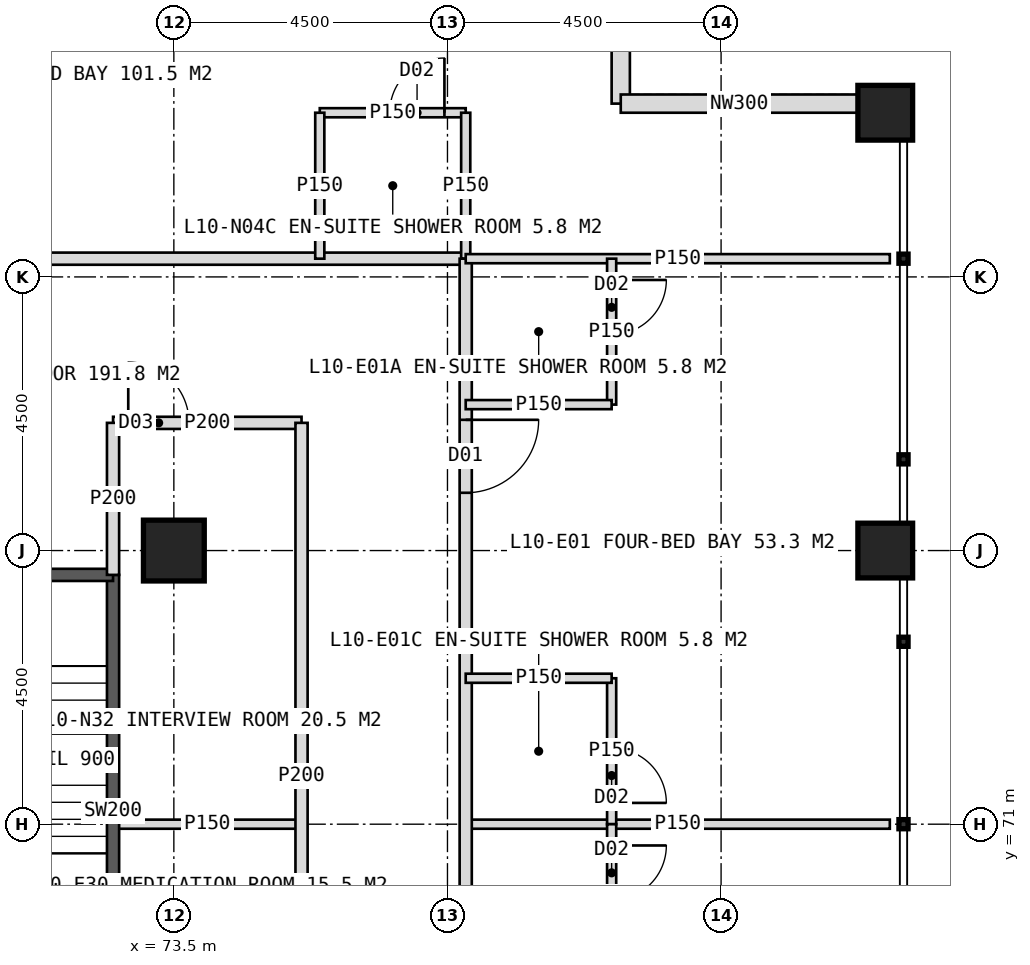
"""IFC4 building model, lengths in metres.
Left out: names, types, materials, properties, quantities, classifications, styles, units other than length and angle.
Written with IfcOpenShell. Run it as: python <this file> out.ifc"""

import sys

from ifc_helpers import new_model, si_unit, direction, frame, frame_2d, origin, origin_2d, place, context, subcontext, project, spatial, rectangle, hollow_rectangle, extrude, element, fill, save


model = new_model("IFC4")
c1 = context("Model", 3, precision=1e-05, world=origin(), true_north=direction((0.0, 1.0)))
c2 = subcontext(c1, "Body", "Model", "MODEL_VIEW")
j1 = project(units=[si_unit("LENGTHUNIT", "METRE"), si_unit("PLANEANGLEUNIT", "RADIAN")], contexts=[c1])
p1 = place(None, origin())
s1 = spatial("IfcSite", under=j1, at=p1, CompositionType="ELEMENT")
p2 = place(p1, origin())
s2 = spatial("IfcBuilding", under=s1, at=p2, CompositionType="ELEMENT")
p3 = place(p2, frame((0.0, 0.0, 47.0)))
s3 = spatial("IfcBuildingStorey", under=s2, at=p3, CompositionType="ELEMENT", Elevation=47.0)
p4 = place(p3, frame((73.5, 75.5, 0.0), z_axis=(0.0, 0.0, 1.0), x_axis=(1.0, 0.0, 0.0)))
e1 = element("IfcColumn", 1, at=p4, inside=s3, PredefinedType="COLUMN", context=c2, shape_type="SweptSolid", body=[
    extrude(hollow_rectangle(XDim=1.0, YDim=1.0, WallThickness=0.1, at=origin_2d()), origin(), (0.0, 0.0, 1.0), 4.0),
])
for number, where, z_axis, x_axis in (
    (2, (85.2, 75.5, 0.0), (0.0, 0.0, 1.0), (1.0, 0.0, 0.0)),
    (3, (85.2, 82.7, 0.0), (0.0, 0.0, 1.0), (1.0, 0.0, 0.0)),
):
    element("IfcColumn", number, at=place(p3, frame(where, z_axis=z_axis, x_axis=x_axis)), inside=s3, PredefinedType="COLUMN", context=c2, shape_type="SweptSolid", body=[
        extrude(hollow_rectangle(XDim=0.9, YDim=0.9, WallThickness=0.08, at=origin_2d()), origin(), (0.0, 0.0, 1.0), 4.0),
    ])
for number, where, z_axis, x_axis in (
    (4, (80.85, 86.75, 0.0), (0.0, 0.0, 1.0), (0.0, -1.0, 0.0)),
    (5, (80.85, 82.85, 0.0), (0.0, 0.0, 1.0), (1.0, 0.0, 0.0)),
):
    element("IfcWall", number, at=place(p3, frame(where, z_axis=z_axis, x_axis=x_axis)), inside=s3, PredefinedType="ELEMENTEDWALL", context=c2, shape_type="SweptSolid", body=[
        extrude(rectangle(XDim=3.9, YDim=0.3, at=frame_2d((1.95, 0.0))), origin(), (0.0, 0.0, 1.0), 2.95),
    ])
p5 = place(p3, frame((41.7, 80.3, 0.0), z_axis=(0.0, 0.0, 1.0), x_axis=(1.0, 0.0, 0.0)))
e6 = element("IfcWall", 6, at=p5, inside=s3, PredefinedType="PARTITIONING", context=c2, shape_type="SweptSolid", body=[
    extrude(rectangle(XDim=36.6, YDim=0.2, at=frame_2d((18.3, 0.0))), origin(), (0.0, 0.0, 1.0), 3.75),
])
p6 = place(p5, frame((2.65, 0.0, 0.0)))
e7 = element("IfcOpeningElement", 7, at=p6, cuts=e6, PredefinedType="OPENING", context=c2, shape_type="SweptSolid", body=[
    extrude(rectangle(XDim=1.2, YDim=2.2, at=frame_2d((0.6, 1.1))), frame((0.0, 0.11, 0.0), z_axis=(0.0, -1.0, 0.0), x_axis=(1.0, 0.0, 0.0)), (0.0, 0.0, 1.0), 0.22),
])
p7 = place(p5, frame((11.95, 0.0, 0.0)))
e8 = element("IfcOpeningElement", 8, at=p7, cuts=e6, PredefinedType="OPENING", context=c2, shape_type="SweptSolid", body=[
    extrude(rectangle(XDim=1.2, YDim=2.2, at=frame_2d((0.6, 1.1))), frame((0.0, 0.11, 0.0), z_axis=(0.0, -1.0, 0.0), x_axis=(1.0, 0.0, 0.0)), (0.0, 0.0, 1.0), 0.22),
])
p8 = place(p5, frame((20.8, 0.0, 0.0)))
e9 = element("IfcOpeningElement", 9, at=p8, cuts=e6, PredefinedType="OPENING", context=c2, shape_type="SweptSolid", body=[
    extrude(rectangle(XDim=1.0, YDim=2.1, at=frame_2d((0.5, 1.05))), frame((0.0, 0.11, 0.0), z_axis=(0.0, -1.0, 0.0), x_axis=(1.0, 0.0, 0.0)), (0.0, 0.0, 1.0), 0.22),
])
p9 = place(p5, frame((26.95, 0.0, 0.0)))
e10 = element("IfcOpeningElement", 10, at=p9, cuts=e6, PredefinedType="OPENING", context=c2, shape_type="SweptSolid", body=[
    extrude(rectangle(XDim=1.2, YDim=2.2, at=frame_2d((0.6, 1.1))), frame((0.0, 0.11, 0.0), z_axis=(0.0, -1.0, 0.0), x_axis=(1.0, 0.0, 0.0)), (0.0, 0.0, 1.0), 0.22),
])
p10 = place(p3, frame((75.9, 82.7, 0.0), z_axis=(0.0, 0.0, 1.0), x_axis=(1.0, 0.0, 0.0)))
e11 = element("IfcWall", 11, at=p10, inside=s3, PredefinedType="PARTITIONING", context=c2, shape_type="SweptSolid", body=[
    extrude(rectangle(XDim=2.4, YDim=0.15, at=frame_2d((1.2, 0.0))), origin(), (0.0, 0.0, 1.0), 2.95),
])
p11 = place(p10, frame((1.15, 0.0, 0.0)))
e12 = element("IfcOpeningElement", 12, at=p11, cuts=e11, PredefinedType="OPENING", context=c2, shape_type="SweptSolid", body=[
    extrude(rectangle(XDim=0.9, YDim=2.1, at=frame_2d((0.45, 1.05))), frame((0.0, 0.085, 0.0), z_axis=(0.0, -1.0, 0.0), x_axis=(1.0, 0.0, 0.0)), (0.0, 0.0, 1.0), 0.17),
])
for number, where, z_axis, x_axis in (
    (13, (75.9, 80.3, 0.0), (0.0, 0.0, 1.0), (0.0, 1.0, 0.0)),
    (14, (78.3, 80.3, 0.0), (0.0, 0.0, 1.0), (0.0, 1.0, 0.0)),
):
    element("IfcWall", number, at=place(p3, frame(where, z_axis=z_axis, x_axis=x_axis)), inside=s3, PredefinedType="PARTITIONING", context=c2, shape_type="SweptSolid", body=[
        extrude(rectangle(XDim=2.4, YDim=0.15, at=frame_2d((1.2, 0.0))), origin(), (0.0, 0.0, 1.0), 3.75),
    ])
p12 = place(p3, frame((72.5, 77.6, 0.0), z_axis=(0.0, 0.0, 1.0), x_axis=(1.0, 0.0, 0.0)))
e15 = element("IfcWall", 15, at=p12, inside=s3, PredefinedType="PARTITIONING", context=c2, shape_type="SweptSolid", body=[
    extrude(rectangle(XDim=3.1, YDim=0.2, at=frame_2d((1.55, 0.0))), origin(), (0.0, 0.0, 1.0), 3.75),
])
p13 = place(p12, frame((0.25, 0.0, 0.0)))
e16 = element("IfcOpeningElement", 16, at=p13, cuts=e15, PredefinedType="OPENING", context=c2, shape_type="SweptSolid", body=[
    extrude(rectangle(XDim=1.0, YDim=2.1, at=frame_2d((0.5, 1.05))), frame((0.0, 0.11, 0.0), z_axis=(0.0, -1.0, 0.0), x_axis=(1.0, 0.0, 0.0)), (0.0, 0.0, 1.0), 0.22),
])
p14 = place(p3, frame((78.3, 71.0, 0.0), z_axis=(0.0, 0.0, 1.0), x_axis=(1.0, 0.0, 0.0)))
e17 = element("IfcWall", 17, at=p14, inside=s3, PredefinedType="PARTITIONING", context=c2, shape_type="SweptSolid", body=[
    extrude(rectangle(XDim=6.975, YDim=0.15, at=frame_2d((3.487, 0.0))), origin(), (0.0, 0.0, 1.0), 3.75),
])
p15 = place(p3, frame((78.3, 80.3, 0.0), z_axis=(0.0, 0.0, 1.0), x_axis=(0.0, -1.0, 0.0)))
e18 = element("IfcWall", 18, at=p15, inside=s3, PredefinedType="PARTITIONING", context=c2, shape_type="SweptSolid", body=[
    extrude(rectangle(XDim=36.6, YDim=0.2, at=frame_2d((18.3, 0.0))), origin(), (0.0, 0.0, 1.0), 3.75),
])
p16 = place(p15, frame((2.65, 0.0, 0.0)))
e19 = element("IfcOpeningElement", 19, at=p16, cuts=e18, PredefinedType="OPENING", context=c2, shape_type="SweptSolid", body=[
    extrude(rectangle(XDim=1.2, YDim=2.2, at=frame_2d((0.6, 1.1))), frame((0.0, 0.11, 0.0), z_axis=(0.0, -1.0, 0.0), x_axis=(1.0, 0.0, 0.0)), (0.0, 0.0, 1.0), 0.22),
])
p17 = place(p15, frame((11.95, 0.0, 0.0)))
e20 = element("IfcOpeningElement", 20, at=p17, cuts=e18, PredefinedType="OPENING", context=c2, shape_type="SweptSolid", body=[
    extrude(rectangle(XDim=1.2, YDim=2.2, at=frame_2d((0.6, 1.1))), frame((0.0, 0.11, 0.0), z_axis=(0.0, -1.0, 0.0), x_axis=(1.0, 0.0, 0.0)), (0.0, 0.0, 1.0), 0.22),
])
p18 = place(p15, frame((20.95, 0.0, 0.0)))
e21 = element("IfcOpeningElement", 21, at=p18, cuts=e18, PredefinedType="OPENING", context=c2, shape_type="SweptSolid", body=[
    extrude(rectangle(XDim=1.2, YDim=2.2, at=frame_2d((0.6, 1.1))), frame((0.0, 0.11, 0.0), z_axis=(0.0, -1.0, 0.0), x_axis=(1.0, 0.0, 0.0)), (0.0, 0.0, 1.0), 0.22),
])
p19 = place(p15, frame((29.95, 0.0, 0.0)))
e22 = element("IfcOpeningElement", 22, at=p19, cuts=e18, PredefinedType="OPENING", context=c2, shape_type="SweptSolid", body=[
    extrude(rectangle(XDim=1.2, YDim=2.2, at=frame_2d((0.6, 1.1))), frame((0.0, 0.11, 0.0), z_axis=(0.0, -1.0, 0.0), x_axis=(1.0, 0.0, 0.0)), (0.0, 0.0, 1.0), 0.22),
])
p20 = place(p3, frame((78.3, 80.3, 0.0), z_axis=(0.0, 0.0, 1.0), x_axis=(1.0, 0.0, 0.0)))
e23 = element("IfcWall", 23, at=p20, inside=s3, PredefinedType="PARTITIONING", context=c2, shape_type="SweptSolid", body=[
    extrude(rectangle(XDim=6.975, YDim=0.15, at=frame_2d((3.487, 0.0))), origin(), (0.0, 0.0, 1.0), 3.75),
])
p21 = place(p3, frame((80.7, 80.3, 0.0), z_axis=(0.0, 0.0, 1.0), x_axis=(0.0, -1.0, 0.0)))
e24 = element("IfcWall", 24, at=p21, inside=s3, PredefinedType="PARTITIONING", context=c2, shape_type="SweptSolid", body=[
    extrude(rectangle(XDim=2.4, YDim=0.15, at=frame_2d((1.2, 0.0))), origin(), (0.0, 0.0, 1.0), 2.95),
])
p22 = place(p21, frame((0.35, 0.0, 0.0)))
e25 = element("IfcOpeningElement", 25, at=p22, cuts=e24, PredefinedType="OPENING", context=c2, shape_type="SweptSolid", body=[
    extrude(rectangle(XDim=0.9, YDim=2.1, at=frame_2d((0.45, 1.05))), frame((0.0, 0.085, 0.0), z_axis=(0.0, -1.0, 0.0), x_axis=(1.0, 0.0, 0.0)), (0.0, 0.0, 1.0), 0.17),
])
p23 = place(p3, frame((78.3, 77.9, 0.0), z_axis=(0.0, 0.0, 1.0), x_axis=(1.0, 0.0, 0.0)))
e26 = element("IfcWall", 26, at=p23, inside=s3, PredefinedType="PARTITIONING", context=c2, shape_type="SweptSolid", body=[
    extrude(rectangle(XDim=2.4, YDim=0.15, at=frame_2d((1.2, 0.0))), origin(), (0.0, 0.0, 1.0), 3.75),
])
p24 = place(p3, frame((80.7, 73.4, 0.0), z_axis=(0.0, 0.0, 1.0), x_axis=(0.0, -1.0, 0.0)))
e27 = element("IfcWall", 27, at=p24, inside=s3, PredefinedType="PARTITIONING", context=c2, shape_type="SweptSolid", body=[
    extrude(rectangle(XDim=2.4, YDim=0.15, at=frame_2d((1.2, 0.0))), origin(), (0.0, 0.0, 1.0), 3.75),
])
p25 = place(p24, frame((1.15, 0.0, 0.0)))
e28 = element("IfcOpeningElement", 28, at=p25, cuts=e27, PredefinedType="OPENING", context=c2, shape_type="SweptSolid", body=[
    extrude(rectangle(XDim=0.9, YDim=2.1, at=frame_2d((0.45, 1.05))), frame((0.0, 0.085, 0.0), z_axis=(0.0, -1.0, 0.0), x_axis=(1.0, 0.0, 0.0)), (0.0, 0.0, 1.0), 0.17),
])
p26 = place(p3, frame((78.3, 73.4, 0.0), z_axis=(0.0, 0.0, 1.0), x_axis=(1.0, 0.0, 0.0)))
e29 = element("IfcWall", 29, at=p26, inside=s3, PredefinedType="PARTITIONING", context=c2, shape_type="SweptSolid", body=[
    extrude(rectangle(XDim=2.4, YDim=0.15, at=frame_2d((1.2, 0.0))), origin(), (0.0, 0.0, 1.0), 3.75),
])
p27 = place(p3, frame((80.7, 71.0, 0.0), z_axis=(0.0, 0.0, 1.0), x_axis=(0.0, -1.0, 0.0)))
e30 = element("IfcWall", 30, at=p27, inside=s3, PredefinedType="PARTITIONING", context=c2, shape_type="SweptSolid", body=[
    extrude(rectangle(XDim=2.4, YDim=0.15, at=frame_2d((1.2, 0.0))), origin(), (0.0, 0.0, 1.0), 3.75),
])
p28 = place(p27, frame((0.35, 0.0, 0.0)))
e31 = element("IfcOpeningElement", 31, at=p28, cuts=e30, PredefinedType="OPENING", context=c2, shape_type="SweptSolid", body=[
    extrude(rectangle(XDim=0.9, YDim=2.1, at=frame_2d((0.45, 1.05))), frame((0.0, 0.085, 0.0), z_axis=(0.0, -1.0, 0.0), x_axis=(1.0, 0.0, 0.0)), (0.0, 0.0, 1.0), 0.17),
])
p29 = place(p3, frame((72.5, 71.0, 0.0), z_axis=(0.0, 0.0, 1.0), x_axis=(1.0, 0.0, 0.0)))
e32 = element("IfcWall", 32, at=p29, inside=s3, PredefinedType="PARTITIONING", context=c2, shape_type="SweptSolid", body=[
    extrude(rectangle(XDim=3.1, YDim=0.15, at=frame_2d((1.55, 0.0))), origin(), (0.0, 0.0, 1.0), 3.75),
])
p30 = place(p3, frame((75.6, 77.6, 0.0), z_axis=(0.0, 0.0, 1.0), x_axis=(0.0, -1.0, 0.0)))
e33 = element("IfcWall", 33, at=p30, inside=s3, PredefinedType="PARTITIONING", context=c2, shape_type="SweptSolid", body=[
    extrude(rectangle(XDim=11.6, YDim=0.2, at=frame_2d((5.8, 0.0))), origin(), (0.0, 0.0, 1.0), 3.75),
])
p31 = place(p30, frame((8.6, 0.0, 0.0)))
e34 = element("IfcOpeningElement", 34, at=p31, cuts=e33, PredefinedType="OPENING", context=c2, shape_type="SweptSolid", body=[
    extrude(rectangle(XDim=1.0, YDim=2.1, at=frame_2d((0.5, 1.05))), frame((0.0, 0.11, 0.0), z_axis=(0.0, -1.0, 0.0), x_axis=(1.0, 0.0, 0.0)), (0.0, 0.0, 1.0), 0.22),
])
p32 = place(p3, frame((72.5, 67.35, 0.0), z_axis=(0.0, 0.0, 1.0), x_axis=(0.0, 1.0, 0.0)))
e35 = element("IfcWall", 35, at=p32, inside=s3, PredefinedType="SOLIDWALL", context=c2, shape_type="SweptSolid", body=[
    extrude(rectangle(XDim=7.75, YDim=0.2, at=frame_2d((3.875, 0.0))), origin(), (0.0, 0.0, 1.0), 3.75),
])
p33 = place(p3, frame((69.0, 75.1, 0.0), z_axis=(0.0, 0.0, 1.0), x_axis=(1.0, 0.0, 0.0)))
e36 = element("IfcWall", 36, at=p33, inside=s3, PredefinedType="SOLIDWALL", context=c2, shape_type="SweptSolid", body=[
    extrude(rectangle(XDim=3.5, YDim=0.2, at=frame_2d((1.75, 0.0))), origin(), (0.0, 0.0, 1.0), 3.75),
])
p34 = place(p33, frame((1.15, 0.0, 0.0)))
e37 = element("IfcOpeningElement", 37, at=p34, cuts=e36, PredefinedType="OPENING", context=c2, shape_type="SweptSolid", body=[
    extrude(rectangle(XDim=1.2, YDim=2.1, at=frame_2d((0.6, 1.05))), frame((0.0, 0.11, 0.0), z_axis=(0.0, -1.0, 0.0), x_axis=(1.0, 0.0, 0.0)), (0.0, 0.0, 1.0), 0.22),
])
p35 = place(p3, frame((72.5, 75.1, 0.0), z_axis=(0.0, 0.0, 1.0), x_axis=(0.0, 1.0, 0.0)))
e38 = element("IfcWall", 38, at=p35, inside=s3, PredefinedType="PARTITIONING", context=c2, shape_type="SweptSolid", body=[
    extrude(rectangle(XDim=2.5, YDim=0.2, at=frame_2d((1.25, 0.0))), origin(), (0.0, 0.0, 1.0), 3.75),
])
p36 = place(p11, origin())
e39 = element("IfcDoor", 39, at=p36, inside=s3, OperationType="SINGLE_SWING_RIGHT", PredefinedType="DOOR", context=c2, shape_type="SweptSolid", body=[
    extrude(rectangle(XDim=0.9, YDim=2.1, at=frame_2d((0.45, 1.05))), frame((0.0, 0.025, 0.0), z_axis=(0.0, -1.0, 0.0), x_axis=(1.0, 0.0, 0.0)), (0.0, 0.0, 1.0), 0.05),
])
fill(e12, e39)
p37 = place(p13, origin())
e40 = element("IfcDoor", 40, at=p37, inside=s3, OperationType="SINGLE_SWING_LEFT", PredefinedType="DOOR", context=c2, shape_type="SweptSolid", body=[
    extrude(rectangle(XDim=1.0, YDim=2.1, at=frame_2d((0.5, 1.05))), frame((0.0, 0.025, 0.0), z_axis=(0.0, -1.0, 0.0), x_axis=(1.0, 0.0, 0.0)), (0.0, 0.0, 1.0), 0.05),
])
fill(e16, e40)
p38 = place(p16, origin())
e41 = element("IfcDoor", 41, at=p38, inside=s3, OperationType="SINGLE_SWING_LEFT", PredefinedType="DOOR", context=c2, shape_type="SweptSolid", body=[
    extrude(rectangle(XDim=1.2, YDim=2.2, at=frame_2d((0.6, 1.1))), frame((0.0, 0.025, 0.0), z_axis=(0.0, -1.0, 0.0), x_axis=(1.0, 0.0, 0.0)), (0.0, 0.0, 1.0), 0.05),
])
fill(e19, e41)
p39 = place(p22, origin())
e42 = element("IfcDoor", 42, at=p39, inside=s3, OperationType="SINGLE_SWING_LEFT", PredefinedType="DOOR", context=c2, shape_type="SweptSolid", body=[
    extrude(rectangle(XDim=0.9, YDim=2.1, at=frame_2d((0.45, 1.05))), frame((0.0, 0.025, 0.0), z_axis=(0.0, -1.0, 0.0), x_axis=(1.0, 0.0, 0.0)), (0.0, 0.0, 1.0), 0.05),
])
fill(e25, e42)
p40 = place(p25, origin())
e43 = element("IfcDoor", 43, at=p40, inside=s3, OperationType="SINGLE_SWING_RIGHT", PredefinedType="DOOR", context=c2, shape_type="SweptSolid", body=[
    extrude(rectangle(XDim=0.9, YDim=2.1, at=frame_2d((0.45, 1.05))), frame((0.0, 0.025, 0.0), z_axis=(0.0, -1.0, 0.0), x_axis=(1.0, 0.0, 0.0)), (0.0, 0.0, 1.0), 0.05),
])
fill(e28, e43)
p41 = place(p28, origin())
e44 = element("IfcDoor", 44, at=p41, inside=s3, OperationType="SINGLE_SWING_LEFT", PredefinedType="DOOR", context=c2, shape_type="SweptSolid", body=[
    extrude(rectangle(XDim=0.9, YDim=2.1, at=frame_2d((0.45, 1.05))), frame((0.0, 0.025, 0.0), z_axis=(0.0, -1.0, 0.0), x_axis=(1.0, 0.0, 0.0)), (0.0, 0.0, 1.0), 0.05),
])
fill(e31, e44)
save(model, sys.argv[1])
